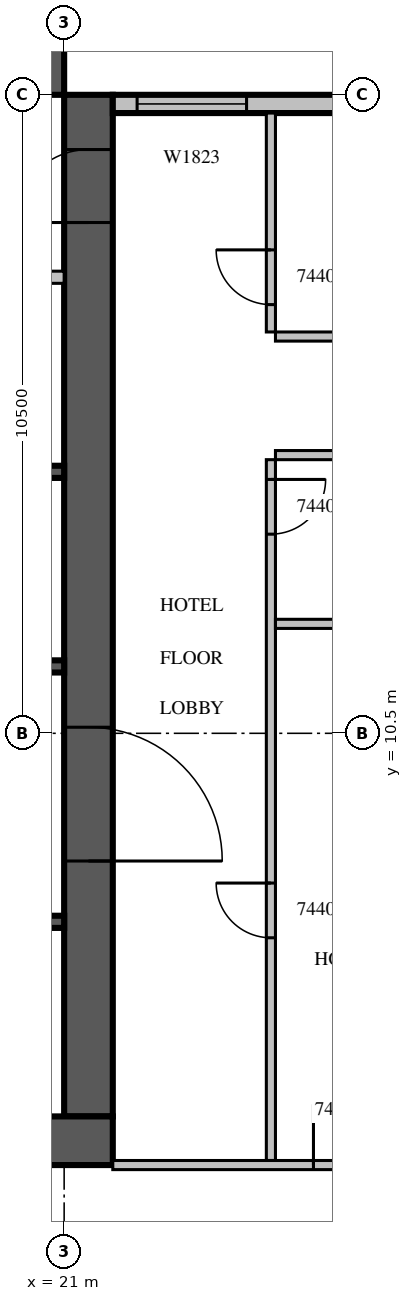
"""IFC4 building model, lengths in metres.
Left out: names, types, materials, properties, quantities, classifications, styles, units other than length and angle.
Written with IfcOpenShell. Run it as: python <this file> out.ifc"""

import sys

from ifc_helpers import new_model, si_unit, direction, frame, frame_2d, origin, place, context, subcontext, project, spatial, rectangle, extrude, source, transform, mapped, element, fill, save


model = new_model("IFC4")
c1 = context("Model", 3, precision=1e-05, world=origin(), true_north=direction((0.0, 1.0)))
c2 = subcontext(c1, "Body", "Model", "MODEL_VIEW")
j1 = project(units=[si_unit("LENGTHUNIT", "METRE"), si_unit("PLANEANGLEUNIT", "RADIAN")], contexts=[c1])
p1 = place(None, origin())
s1 = spatial("IfcSite", under=j1, at=p1, CompositionType="ELEMENT")
p2 = place(p1, origin())
s2 = spatial("IfcBuilding", under=s1, at=p2, CompositionType="ELEMENT")
p3 = place(p2, frame((0.0, 0.0, 200.6)))
s3 = spatial("IfcBuildingStorey", under=s2, at=p3, CompositionType="ELEMENT", Elevation=200.6)
m1 = source(origin(), c2, "Body", "SweptSolid", [
    extrude(rectangle(XDim=16.8, YDim=0.8, at=frame_2d((8.4, 0.0))), origin(), (0.0, 0.0, 1.0), 3.8),
])
p4 = place(p3, frame((21.4, 4.2, 0.0), z_axis=(0.0, 0.0, 1.0), x_axis=(0.0, 1.0, 0.0)))
e1 = element("IfcWall", 1, at=p4, inside=s3, PredefinedType="SHEAR", context=c2, shape_type="MappedRepresentation", body=[
    mapped(m1, transform((0.0, 0.0, 0.0), scale=1.0)),
])
m2 = source(origin(), c2, "Body", "SweptSolid", [
    extrude(rectangle(XDim=2.2, YDim=2.1, at=frame_2d((1.1, 1.05))), frame((0.0, 0.41, 0.0), z_axis=(0.0, -1.0, 0.0), x_axis=(1.0, 0.0, 0.0)), (0.0, 0.0, 1.0), 0.82),
])
p5 = place(p4, frame((4.2, 0.0, 0.0)))
e2 = element("IfcOpeningElement", 2, at=p5, cuts=e1, PredefinedType="OPENING", context=c2, shape_type="MappedRepresentation", body=[
    mapped(m2, transform((0.0, 0.0, 0.0), scale=1.0)),
])
m3 = source(origin(), c2, "Body", "SweptSolid", [
    extrude(rectangle(XDim=1.2, YDim=2.1, at=frame_2d((0.6, 1.05))), frame((0.0, 0.41, 0.0), z_axis=(0.0, -1.0, 0.0), x_axis=(1.0, 0.0, 0.0)), (0.0, 0.0, 1.0), 0.82),
])
p6 = place(p4, frame((14.7, 0.0, 0.0)))
e3 = element("IfcOpeningElement", 3, at=p6, cuts=e1, PredefinedType="OPENING", context=c2, shape_type="MappedRepresentation", body=[
    mapped(m3, transform((0.0, 0.0, 0.0), scale=1.0)),
])
m4 = source(origin(), c2, "Body", "SweptSolid", [
    extrude(rectangle(XDim=17.6, YDim=0.8, at=frame_2d((8.8, 0.0))), origin(), (0.0, 0.0, 1.0), 3.8),
])
p7 = place(p3, frame((4.2, 3.8, 0.0), z_axis=(0.0, 0.0, 1.0), x_axis=(1.0, 0.0, 0.0)))
e4 = element("IfcWall", 4, at=p7, inside=s3, PredefinedType="SHEAR", context=c2, shape_type="MappedRepresentation", body=[
    mapped(m4, transform((0.0, 0.0, 0.0), scale=1.0)),
])
m5 = source(origin(), c2, "Body", "SweptSolid", [
    extrude(rectangle(XDim=0.9, YDim=2.1, at=frame_2d((0.45, 1.05))), frame((0.0, 0.41, 0.0), z_axis=(0.0, -1.0, 0.0), x_axis=(1.0, 0.0, 0.0)), (0.0, 0.0, 1.0), 0.82),
])
p8 = place(p7, frame((12.75, 0.0, 0.0)))
e5 = element("IfcOpeningElement", 5, at=p8, cuts=e4, PredefinedType="OPENING", context=c2, shape_type="MappedRepresentation", body=[
    mapped(m5, transform((0.0, 0.0, 0.0), scale=1.0)),
])
p9 = place(p3, frame((4.2, 21.4, 0.0), z_axis=(0.0, 0.0, 1.0), x_axis=(1.0, 0.0, 0.0)))
e6 = element("IfcWall", 6, at=p9, inside=s3, PredefinedType="SHEAR", context=c2, shape_type="MappedRepresentation", body=[
    mapped(m1, transform((0.0, 0.0, 0.0), scale=1.0)),
])
p10 = place(p9, frame((6.2, 0.0, 0.0)))
e7 = element("IfcOpeningElement", 7, at=p10, cuts=e6, PredefinedType="OPENING", context=c2, shape_type="MappedRepresentation", body=[
    mapped(m3, transform((0.0, 0.0, 0.0), scale=1.0)),
])
m6 = source(origin(), c2, "Body", "SweptSolid", [
    extrude(rectangle(XDim=7.15, YDim=0.3, at=frame_2d((3.575, 0.0))), origin(), (0.0, 0.0, 1.0), 3.4),
])
p11 = place(p3, frame((28.95, 20.85, 0.0), z_axis=(0.0, 0.0, 1.0), x_axis=(-1.0, 0.0, 0.0)))
e8 = element("IfcWall", 8, at=p11, inside=s3, PredefinedType="STANDARD", context=c2, shape_type="MappedRepresentation", body=[
    mapped(m6, transform((0.0, 0.0, 0.0), scale=1.0)),
])
m7 = source(origin(), c2, "Body", "SweptSolid", [
    extrude(rectangle(XDim=3.0, YDim=2.3, at=frame_2d((1.5, 1.15))), frame((0.0, 0.16, 0.0), z_axis=(0.0, -1.0, 0.0), x_axis=(1.0, 0.0, 0.0)), (0.0, 0.0, 1.0), 0.32),
])
p12 = place(p11, frame((0.15, 0.0, 0.6)))
e9 = element("IfcOpeningElement", 9, at=p12, cuts=e8, PredefinedType="OPENING", context=c2, shape_type="MappedRepresentation", body=[
    mapped(m7, transform((0.0, 0.0, 0.0), scale=1.0)),
])
m8 = source(origin(), c2, "Body", "SweptSolid", [
    extrude(rectangle(XDim=1.8, YDim=2.3, at=frame_2d((0.9, 1.15))), frame((0.0, 0.16, 0.0), z_axis=(0.0, -1.0, 0.0), x_axis=(1.0, 0.0, 0.0)), (0.0, 0.0, 1.0), 0.32),
])
p13 = place(p11, frame((4.95, 0.0, 0.6)))
e10 = element("IfcOpeningElement", 10, at=p13, cuts=e8, PredefinedType="OPENING", context=c2, shape_type="MappedRepresentation", body=[
    mapped(m8, transform((0.0, 0.0, 0.0), scale=1.0)),
])
m9 = source(origin(), c2, "Body", "SweptSolid", [
    extrude(rectangle(XDim=2.4, YDim=0.2, at=frame_2d((1.2, 0.0))), origin(), (0.0, 0.0, 1.0), 3.8),
])
p14 = place(p3, frame((18.6, 7.4, 0.0), z_axis=(0.0, 0.0, 1.0), x_axis=(1.0, 0.0, 0.0)))
e11 = element("IfcWall", 11, at=p14, inside=s3, PredefinedType="SOLIDWALL", context=c2, shape_type="MappedRepresentation", body=[
    mapped(m9, transform((0.0, 0.0, 0.0), scale=1.0)),
])
m10 = source(origin(), c2, "Body", "SweptSolid", [
    extrude(rectangle(XDim=9.6, YDim=0.2, at=frame_2d((4.8, 0.0))), origin(), (0.0, 0.0, 1.0), 3.8),
])
p15 = place(p3, frame((11.4, 11.6, 0.0), z_axis=(0.0, 0.0, 1.0), x_axis=(1.0, 0.0, 0.0)))
e12 = element("IfcWall", 12, at=p15, inside=s3, PredefinedType="SOLIDWALL", context=c2, shape_type="MappedRepresentation", body=[
    mapped(m10, transform((0.0, 0.0, 0.0), scale=1.0)),
])
p16 = place(p3, frame((11.4, 14.8, 0.0), z_axis=(0.0, 0.0, 1.0), x_axis=(1.0, 0.0, 0.0)))
e13 = element("IfcWall", 13, at=p16, inside=s3, PredefinedType="SOLIDWALL", context=c2, shape_type="MappedRepresentation", body=[
    mapped(m10, transform((0.0, 0.0, 0.0), scale=1.0)),
])
m11 = source(origin(), c2, "Body", "SweptSolid", [
    extrude(rectangle(XDim=1.1, YDim=2.1, at=frame_2d((0.55, 1.05))), frame((0.0, 0.11, 0.0), z_axis=(0.0, -1.0, 0.0), x_axis=(1.0, 0.0, 0.0)), (0.0, 0.0, 1.0), 0.22),
])
p17 = place(p16, frame((3.05, 0.0, 0.0)))
e14 = element("IfcOpeningElement", 14, at=p17, cuts=e13, PredefinedType="OPENING", context=c2, shape_type="MappedRepresentation", body=[
    mapped(m11, transform((0.0, 0.0, 0.0), scale=1.0)),
])
p18 = place(p16, frame((5.45, 0.0, 0.0)))
e15 = element("IfcOpeningElement", 15, at=p18, cuts=e13, PredefinedType="OPENING", context=c2, shape_type="MappedRepresentation", body=[
    mapped(m11, transform((0.0, 0.0, 0.0), scale=1.0)),
])
p19 = place(p16, frame((7.85, 0.0, 0.0)))
e16 = element("IfcOpeningElement", 16, at=p19, cuts=e13, PredefinedType="OPENING", context=c2, shape_type="MappedRepresentation", body=[
    mapped(m11, transform((0.0, 0.0, 0.0), scale=1.0)),
])
m12 = source(origin(), c2, "Body", "SweptSolid", [
    extrude(rectangle(XDim=11.45, YDim=0.2, at=frame_2d((5.725, 0.0))), origin(), (0.0, 0.0, 1.0), 3.4),
])
p20 = place(p3, frame((9.55, 18.0, 0.0), z_axis=(0.0, 0.0, 1.0), x_axis=(1.0, 0.0, 0.0)))
e17 = element("IfcWall", 17, at=p20, inside=s3, PredefinedType="PARTITIONING", context=c2, shape_type="MappedRepresentation", body=[
    mapped(m12, transform((0.0, 0.0, 0.0), scale=1.0)),
])
m13 = source(origin(), c2, "Body", "SweptSolid", [
    extrude(rectangle(XDim=0.9, YDim=2.1, at=frame_2d((0.45, 1.05))), frame((0.0, 0.11, 0.0), z_axis=(0.0, -1.0, 0.0), x_axis=(1.0, 0.0, 0.0)), (0.0, 0.0, 1.0), 0.22),
])
p21 = place(p20, frame((0.475, 0.0, 0.0)))
e18 = element("IfcOpeningElement", 18, at=p21, cuts=e17, PredefinedType="OPENING", context=c2, shape_type="MappedRepresentation", body=[
    mapped(m13, transform((0.0, 0.0, 0.0), scale=1.0)),
])
p22 = place(p20, frame((1.85, 0.0, 0.0)))
e19 = element("IfcOpeningElement", 19, at=p22, cuts=e17, PredefinedType="OPENING", context=c2, shape_type="MappedRepresentation", body=[
    mapped(m13, transform((0.0, 0.0, 0.0), scale=1.0)),
])
p23 = place(p20, frame((3.125, 0.0, 0.0)))
e20 = element("IfcOpeningElement", 20, at=p23, cuts=e17, PredefinedType="OPENING", context=c2, shape_type="MappedRepresentation", body=[
    mapped(m13, transform((0.0, 0.0, 0.0), scale=1.0)),
])
p24 = place(p20, frame((7.35, 0.0, 0.0)))
e21 = element("IfcOpeningElement", 21, at=p24, cuts=e17, PredefinedType="OPENING", context=c2, shape_type="MappedRepresentation", body=[
    mapped(m11, transform((0.0, 0.0, 0.0), scale=1.0)),
])
m14 = source(origin(), c2, "Body", "SweptSolid", [
    extrude(rectangle(XDim=11.525, YDim=0.15, at=frame_2d((5.763, 0.0))), origin(), (0.0, 0.0, 1.0), 3.4),
])
p25 = place(p3, frame((24.4, 15.0, 0.0), z_axis=(0.0, 0.0, 1.0), x_axis=(0.0, -1.0, 0.0)))
e22 = element("IfcWall", 22, at=p25, inside=s3, PredefinedType="PARTITIONING", context=c2, shape_type="MappedRepresentation", body=[
    mapped(m14, transform((0.0, 0.0, 0.0), scale=1.0)),
])
m15 = source(origin(), c2, "Body", "SweptSolid", [
    extrude(rectangle(XDim=0.9, YDim=2.1, at=frame_2d((0.45, 1.05))), frame((0.0, 0.085, 0.0), z_axis=(0.0, -1.0, 0.0), x_axis=(1.0, 0.0, 0.0)), (0.0, 0.0, 1.0), 0.17),
])
p26 = place(p25, frame((6.963, 0.0, 0.0)))
e23 = element("IfcOpeningElement", 23, at=p26, cuts=e22, PredefinedType="OPENING", context=c2, shape_type="MappedRepresentation", body=[
    mapped(m15, transform((0.0, 0.0, 0.0), scale=1.0)),
])
p27 = place(p25, frame((0.325, 0.0, 0.0)))
e24 = element("IfcOpeningElement", 24, at=p27, cuts=e22, PredefinedType="OPENING", context=c2, shape_type="MappedRepresentation", body=[
    mapped(m15, transform((0.0, 0.0, 0.0), scale=1.0)),
])
m16 = source(origin(), c2, "Body", "SweptSolid", [
    extrude(rectangle(XDim=3.6, YDim=0.15, at=frame_2d((1.8, 0.0))), origin(), (0.0, 0.0, 1.0), 3.4),
])
p28 = place(p3, frame((24.4, 20.7, 0.0), z_axis=(0.0, 0.0, 1.0), x_axis=(0.0, -1.0, 0.0)))
e25 = element("IfcWall", 25, at=p28, inside=s3, PredefinedType="PARTITIONING", context=c2, shape_type="MappedRepresentation", body=[
    mapped(m16, transform((0.0, 0.0, 0.0), scale=1.0)),
])
p29 = place(p28, frame((2.25, 0.0, 0.0)))
e26 = element("IfcOpeningElement", 26, at=p29, cuts=e25, PredefinedType="OPENING", context=c2, shape_type="MappedRepresentation", body=[
    mapped(m15, transform((0.0, 0.0, 0.0), scale=1.0)),
])
p30 = place(p3, frame((29.325, 12.3, 0.0), z_axis=(0.0, 0.0, 1.0), x_axis=(-1.0, 0.0, 0.0)))
e27 = element("IfcWall", 27, at=p30, inside=s3, PredefinedType="PARTITIONING", context=c2, shape_type="SweptSolid", body=[
    extrude(rectangle(XDim=4.85, YDim=0.15, at=frame_2d((2.425, 0.0))), origin(), (0.0, 0.0, 1.0), 3.4),
])
m17 = source(origin(), c2, "Body", "SweptSolid", [
    extrude(rectangle(XDim=4.85, YDim=0.15, at=frame_2d((2.425, 0.0))), origin(), (0.0, 0.0, 1.0), 3.4),
])
for number, where, z_axis, x_axis in (
    (28, (29.325, 15.075, 0.0), (0.0, 0.0, 1.0), (-1.0, 0.0, 0.0)),
    (29, (24.475, 17.025, 0.0), (0.0, 0.0, 1.0), (1.0, 0.0, 0.0)),
):
    element("IfcWall", number, at=place(p3, frame(where, z_axis=z_axis, x_axis=x_axis)), inside=s3, PredefinedType="PARTITIONING", context=c2, shape_type="MappedRepresentation", body=[
        mapped(m17, transform((0.0, 0.0, 0.0), scale=1.0)),
    ])
m18 = source(origin(), c2, "Body", "SweptSolid", [
    extrude(rectangle(XDim=7.525, YDim=0.15, at=frame_2d((3.763, 0.0))), origin(), (0.0, 0.0, 1.0), 3.4),
])
p31 = place(p3, frame((21.8, 3.4, 0.0), z_axis=(0.0, 0.0, 1.0), x_axis=(1.0, 0.0, 0.0)))
e30 = element("IfcWall", 30, at=p31, inside=s3, PredefinedType="PARTITIONING", context=c2, shape_type="MappedRepresentation", body=[
    mapped(m18, transform((0.0, 0.0, 0.0), scale=1.0)),
])
m19 = source(origin(), c2, "Body", "SweptSolid", [
    extrude(rectangle(XDim=1.0, YDim=2.1, at=frame_2d((0.5, 1.05))), frame((0.0, 0.085, 0.0), z_axis=(0.0, -1.0, 0.0), x_axis=(1.0, 0.0, 0.0)), (0.0, 0.0, 1.0), 0.17),
])
p32 = place(p31, frame((3.3, 0.0, 0.0)))
e31 = element("IfcOpeningElement", 31, at=p32, cuts=e30, PredefinedType="OPENING", context=c2, shape_type="MappedRepresentation", body=[
    mapped(m19, transform((0.0, 0.0, 0.0), scale=1.0)),
])
p33 = place(p31, frame((4.363, 0.0, 0.0)))
e32 = element("IfcOpeningElement", 32, at=p33, cuts=e30, PredefinedType="OPENING", context=c2, shape_type="MappedRepresentation", body=[
    mapped(m15, transform((0.0, 0.0, 0.0), scale=1.0)),
])
m20 = source(origin(), c2, "Body", "SweptSolid", [
    extrude(rectangle(XDim=1.8, YDim=2.3, at=frame_2d((0.9, 1.15))), frame((0.0, 0.03, 0.0), z_axis=(0.0, -1.0, 0.0), x_axis=(1.0, 0.0, 0.0)), (0.0, 0.0, 1.0), 0.06),
])
p34 = place(p13, origin())
e33 = element("IfcWindow", 33, at=p34, inside=s3, PartitioningType="SINGLE_PANEL", PredefinedType="WINDOW", context=c2, shape_type="MappedRepresentation", body=[
    mapped(m20, transform((0.0, 0.0, 0.0), scale=1.0)),
])
fill(e10, e33)
m21 = source(origin(), c2, "Body", "SweptSolid", [
    extrude(rectangle(XDim=2.2, YDim=2.1, at=frame_2d((1.1, 1.05))), frame((0.0, 0.025, 0.0), z_axis=(0.0, -1.0, 0.0), x_axis=(1.0, 0.0, 0.0)), (0.0, 0.0, 1.0), 0.05),
])
p35 = place(p5, origin())
e34 = element("IfcDoor", 34, at=p35, inside=s3, OperationType="DOUBLE_DOOR_SINGLE_SWING", PredefinedType="DOOR", context=c2, shape_type="MappedRepresentation", body=[
    mapped(m21, transform((0.0, 0.0, 0.0), scale=1.0)),
])
fill(e2, e34)
m22 = source(origin(), c2, "Body", "SweptSolid", [
    extrude(rectangle(XDim=1.2, YDim=2.1, at=frame_2d((0.6, 1.05))), frame((0.0, 0.025, 0.0), z_axis=(0.0, -1.0, 0.0), x_axis=(1.0, 0.0, 0.0)), (0.0, 0.0, 1.0), 0.05),
])
p36 = place(p6, origin())
e35 = element("IfcDoor", 35, at=p36, inside=s3, OperationType="SINGLE_SWING_LEFT", PredefinedType="DOOR", context=c2, shape_type="MappedRepresentation", body=[
    mapped(m22, transform((0.0, 0.0, 0.0), scale=1.0)),
])
fill(e3, e35)
m23 = source(origin(), c2, "Body", "SweptSolid", [
    extrude(rectangle(XDim=0.9, YDim=2.1, at=frame_2d((0.45, 1.05))), frame((0.0, 0.025, 0.0), z_axis=(0.0, -1.0, 0.0), x_axis=(1.0, 0.0, 0.0)), (0.0, 0.0, 1.0), 0.05),
])
p37 = place(p26, origin())
e36 = element("IfcDoor", 36, at=p37, inside=s3, OperationType="SINGLE_SWING_RIGHT", PredefinedType="DOOR", context=c2, shape_type="MappedRepresentation", body=[
    mapped(m23, transform((0.0, 0.0, 0.0), scale=1.0)),
])
fill(e23, e36)
p38 = place(p27, origin())
e37 = element("IfcDoor", 37, at=p38, inside=s3, OperationType="SINGLE_SWING_LEFT", PredefinedType="DOOR", context=c2, shape_type="MappedRepresentation", body=[
    mapped(m23, transform((0.0, 0.0, 0.0), scale=1.0)),
])
fill(e24, e37)
p39 = place(p29, origin())
e38 = element("IfcDoor", 38, at=p39, inside=s3, OperationType="SINGLE_SWING_RIGHT", PredefinedType="DOOR", context=c2, shape_type="MappedRepresentation", body=[
    mapped(m23, transform((0.0, 0.0, 0.0), scale=1.0)),
])
fill(e26, e38)
m24 = source(origin(), c2, "Body", "SweptSolid", [
    extrude(rectangle(XDim=1.0, YDim=2.1, at=frame_2d((0.5, 1.05))), frame((0.0, 0.025, 0.0), z_axis=(0.0, -1.0, 0.0), x_axis=(1.0, 0.0, 0.0)), (0.0, 0.0, 1.0), 0.05),
])
p40 = place(p32, origin())
e39 = element("IfcDoor", 39, at=p40, inside=s3, OperationType="SINGLE_SWING_LEFT", PredefinedType="DOOR", context=c2, shape_type="MappedRepresentation", body=[
    mapped(m24, transform((0.0, 0.0, 0.0), scale=1.0)),
])
fill(e31, e39)
save(model, sys.argv[1])
